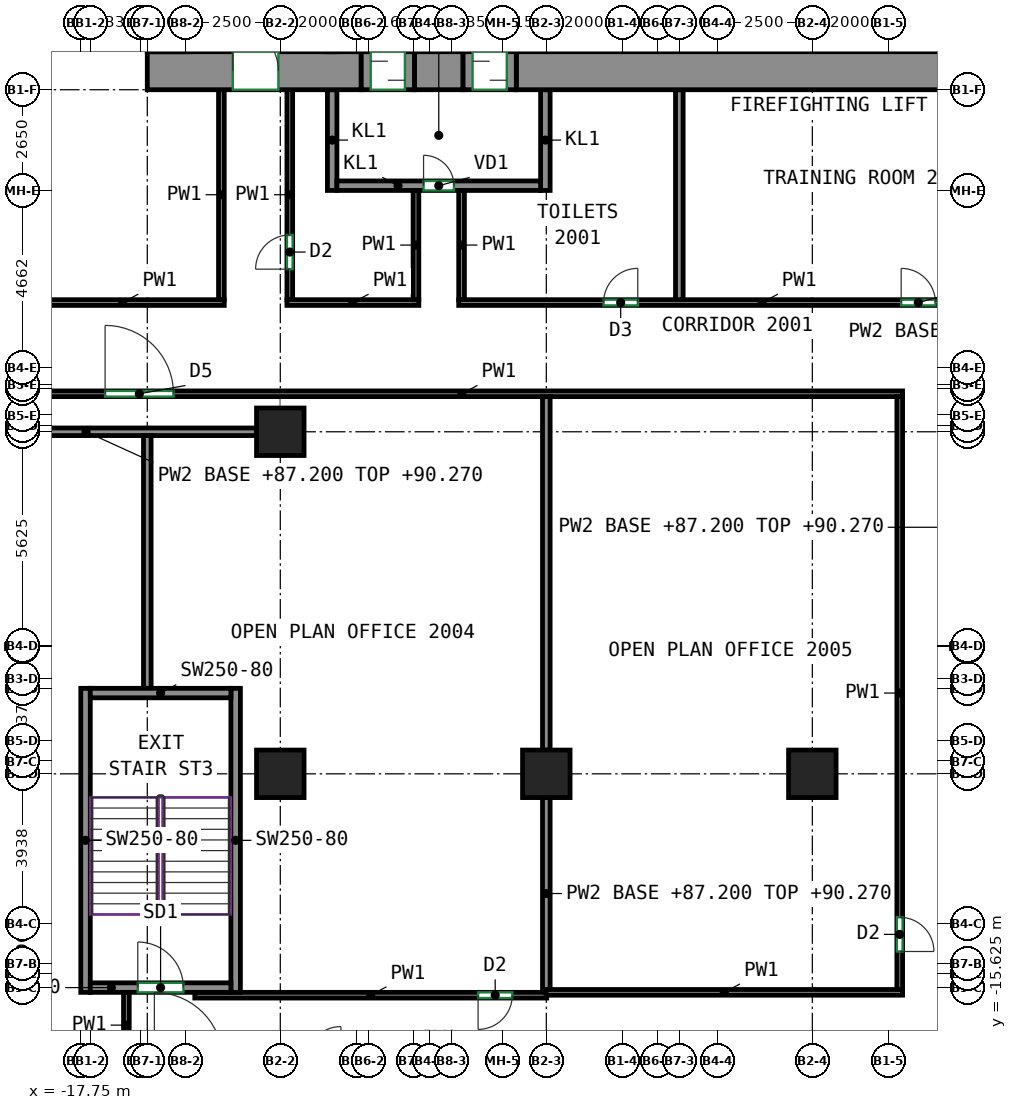
"""IFC4 building model, lengths in metres.
Left out: names, types, materials, properties, quantities, classifications, styles, units other than length and angle.
Written with IfcOpenShell. Run it as: python <this file> out.ifc"""

import sys

from ifc_helpers import new_model, si_unit, direction, frame, frame_2d, origin, origin_2d, place, context, subcontext, project, spatial, rectangle, extrude, source, transform, mapped, element, fill, save


model = new_model("IFC4")
c1 = context("Model", 3, precision=1e-05, world=origin(), true_north=direction((0.0, 1.0)))
c2 = subcontext(c1, "Body", "Model", "MODEL_VIEW")
j1 = project(units=[si_unit("LENGTHUNIT", "METRE"), si_unit("PLANEANGLEUNIT", "RADIAN")], contexts=[c1])
p1 = place(None, origin())
s1 = spatial("IfcSite", under=j1, at=p1, CompositionType="ELEMENT")
p2 = place(p1, origin())
s2 = spatial("IfcBuilding", under=s1, at=p2, CompositionType="ELEMENT")
p3 = place(p2, frame((0.0, 0.0, 87.2)))
s3 = spatial("IfcBuildingStorey", under=s2, at=p3, CompositionType="ELEMENT", Elevation=87.2)
m1 = source(origin(), c2, "Body", "SweptSolid", [
    extrude(rectangle(XDim=1.25, YDim=1.25, at=origin_2d()), origin(), (0.0, 0.0, 1.0), 3.72),
])
for number, where, z_axis, x_axis in (
    (1, (-12.5, -10.0, 0.0), (0.0, 0.0, 1.0), (1.0, 0.0, 0.0)),
    (2, (-12.5, -1.0, 0.0), (0.0, 0.0, 1.0), (1.0, 0.0, 0.0)),
    (3, (-5.5, -10.0, 0.0), (0.0, 0.0, 1.0), (1.0, 0.0, 0.0)),
    (4, (1.5, -10.0, 0.0), (0.0, 0.0, 1.0), (1.0, 0.0, 0.0)),
):
    element("IfcColumn", number, at=place(p3, frame(where, z_axis=z_axis, x_axis=x_axis)), inside=s3, PredefinedType="COLUMN", context=c2, shape_type="MappedRepresentation", body=[
        mapped(m1, transform((0.0, 0.0, 0.0))),
    ])
m2 = source(origin(), c2, "Body", "SweptSolid", [
    extrude(rectangle(XDim=5.63, YDim=1.0, at=frame_2d((2.815, 0.0))), origin(), (0.0, 0.0, 1.0), 3.72),
])
p4 = place(p3, frame((-16.0, 8.5, 0.0), z_axis=(0.0, 0.0, 1.0), x_axis=(1.0, 0.0, 0.0)))
e5 = element("IfcWall", 5, at=p4, inside=s3, PredefinedType="SHEAR", context=c2, shape_type="MappedRepresentation", body=[
    mapped(m2, transform((0.0, 0.0, 0.0))),
])
p5 = place(p4, frame((2.25, 0.0, 0.0)))
e6 = element("IfcOpeningElement", 6, at=p5, cuts=e5, PredefinedType="OPENING", context=c2, shape_type="SweptSolid", body=[
    extrude(rectangle(XDim=1.2, YDim=2.1, at=frame_2d((0.6, 1.05))), frame((0.0, 0.51, 0.0), z_axis=(0.0, -1.0, 0.0), x_axis=(1.0, 0.0, 0.0)), (0.0, 0.0, 1.0), 1.02),
])
m3 = source(origin(), c2, "Body", "SweptSolid", [
    extrude(rectangle(XDim=1.28, YDim=1.0, at=frame_2d((0.64, 0.0))), origin(), (0.0, 0.0, 1.0), 3.72),
])
p6 = place(p3, frame((-8.97, 8.5, 0.0), z_axis=(0.0, 0.0, 1.0), x_axis=(1.0, 0.0, 0.0)))
e7 = element("IfcWall", 7, at=p6, inside=s3, PredefinedType="SHEAR", context=c2, shape_type="MappedRepresentation", body=[
    mapped(m3, transform((0.0, 0.0, 0.0))),
])
m4 = source(origin(), c2, "Body", "SweptSolid", [
    extrude(rectangle(XDim=14.18, YDim=1.0, at=frame_2d((7.09, 0.0))), origin(), (0.0, 0.0, 1.0), 3.72),
])
p7 = place(p3, frame((-6.29, 8.5, 0.0), z_axis=(0.0, 0.0, 1.0), x_axis=(1.0, 0.0, 0.0)))
e8 = element("IfcWall", 8, at=p7, inside=s3, PredefinedType="SHEAR", context=c2, shape_type="MappedRepresentation", body=[
    mapped(m4, transform((0.0, 0.0, 0.0))),
])
m5 = source(origin(), c2, "Body", "SweptSolid", [
    extrude(rectangle(XDim=8.0, YDim=0.25, at=frame_2d((4.0, 0.0))), origin(), (0.0, 0.0, 1.0), 3.72),
])
for number, where, z_axis, x_axis in (
    (9, (-17.625, -15.75, 0.0), (0.0, 0.0, 1.0), (0.0, 1.0, 0.0)),
    (10, (-13.675, -15.75, 0.0), (0.0, 0.0, 1.0), (0.0, 1.0, 0.0)),
):
    element("IfcWall", number, at=place(p3, frame(where, z_axis=z_axis, x_axis=x_axis)), inside=s3, PredefinedType="SHEAR", context=c2, shape_type="MappedRepresentation", body=[
        mapped(m5, transform((0.0, 0.0, 0.0))),
    ])
m6 = source(origin(), c2, "Body", "SweptSolid", [
    extrude(rectangle(XDim=3.7, YDim=0.25, at=frame_2d((1.85, 0.0))), origin(), (0.0, 0.0, 1.0), 3.72),
])
p8 = place(p3, frame((-17.5, -15.625, 0.0), z_axis=(0.0, 0.0, 1.0), x_axis=(1.0, 0.0, 0.0)))
e11 = element("IfcWall", 11, at=p8, inside=s3, PredefinedType="SHEAR", context=c2, shape_type="MappedRepresentation", body=[
    mapped(m6, transform((0.0, 0.0, 0.0))),
])
p9 = place(p8, frame((1.25, 0.0, 0.0)))
e12 = element("IfcOpeningElement", 12, at=p9, cuts=e11, PredefinedType="OPENING", context=c2, shape_type="SweptSolid", body=[
    extrude(rectangle(XDim=1.2, YDim=2.1, at=frame_2d((0.6, 1.05))), frame((0.0, 0.135, 0.0), z_axis=(0.0, -1.0, 0.0), x_axis=(1.0, 0.0, 0.0)), (0.0, 0.0, 1.0), 0.27),
])
p10 = place(p3, frame((-17.5, -7.875, 0.0), z_axis=(0.0, 0.0, 1.0), x_axis=(1.0, 0.0, 0.0)))
e13 = element("IfcWall", 13, at=p10, inside=s3, PredefinedType="SHEAR", context=c2, shape_type="MappedRepresentation", body=[
    mapped(m6, transform((0.0, 0.0, 0.0))),
])
m7 = source(origin(), c2, "Body", "SweptSolid", [
    extrude(rectangle(XDim=2.65, YDim=0.25, at=frame_2d((1.325, 0.0))), origin(), (0.0, 0.0, 1.0), 3.72),
])
for number, where, z_axis, x_axis in (
    (14, (-11.135, 5.35, 0.0), (0.0, 0.0, 1.0), (0.0, 1.0, 0.0)),
    (15, (-5.525, 5.35, 0.0), (0.0, 0.0, 1.0), (0.0, 1.0, 0.0)),
):
    element("IfcWall", number, at=place(p3, frame(where, z_axis=z_axis, x_axis=x_axis)), inside=s3, PredefinedType="PARTITIONING", context=c2, shape_type="MappedRepresentation", body=[
        mapped(m7, transform((0.0, 0.0, 0.0))),
    ])
m8 = source(origin(), c2, "Body", "SweptSolid", [
    extrude(rectangle(XDim=5.36, YDim=0.25, at=frame_2d((2.68, 0.0))), origin(), (0.0, 0.0, 1.0), 3.72),
])
p11 = place(p3, frame((-11.01, 5.475, 0.0), z_axis=(0.0, 0.0, 1.0), x_axis=(1.0, 0.0, 0.0)))
e16 = element("IfcWall", 16, at=p11, inside=s3, PredefinedType="PARTITIONING", context=c2, shape_type="MappedRepresentation", body=[
    mapped(m8, transform((0.0, 0.0, 0.0))),
])
p12 = place(p11, frame((2.28, 0.0, 0.0)))
e17 = element("IfcOpeningElement", 17, at=p12, cuts=e16, PredefinedType="OPENING", context=c2, shape_type="SweptSolid", body=[
    extrude(rectangle(XDim=0.8, YDim=2.0, at=frame_2d((0.4, 1.0))), frame((0.0, 0.135, 0.0), z_axis=(0.0, -1.0, 0.0), x_axis=(1.0, 0.0, 0.0)), (0.0, 0.0, 1.0), 0.27),
])
m9 = source(origin(), c2, "Body", "SweptSolid", [
    extrude(rectangle(XDim=1.4, YDim=1.0, at=frame_2d((0.7, 0.0))), origin(), (0.0, 0.0, 1.0), 2.7),
])
p13 = place(p3, frame((-10.37, 8.5, 0.0), z_axis=(0.0, 0.0, 1.0), x_axis=(1.0, 0.0, 0.0)))
e18 = element("IfcWall", 18, at=p13, inside=s3, PredefinedType="PARTITIONING", context=c2, shape_type="MappedRepresentation", body=[
    mapped(m9, transform((0.0, 0.0, 0.0))),
])
p14 = place(p13, frame((0.25, 0.0, 0.0)))
e19 = element("IfcOpeningElement", 19, at=p14, cuts=e18, PredefinedType="OPENING", context=c2, shape_type="SweptSolid", body=[
    extrude(rectangle(XDim=0.9, YDim=2.1, at=frame_2d((0.45, 1.05))), frame((0.0, 0.51, 0.0), z_axis=(0.0, -1.0, 0.0), x_axis=(1.0, 0.0, 0.0)), (0.0, 0.0, 1.0), 1.02),
])
m10 = source(origin(), c2, "Body", "SweptSolid", [
    extrude(rectangle(XDim=1.4, YDim=1.0, at=frame_2d((0.7, 0.0))), origin(), (0.0, 0.0, 1.0), 2.7),
])
p15 = place(p3, frame((-7.69, 8.5, 0.0), z_axis=(0.0, 0.0, 1.0), x_axis=(1.0, 0.0, 0.0)))
e20 = element("IfcWall", 20, at=p15, inside=s3, PredefinedType="PARTITIONING", context=c2, shape_type="MappedRepresentation", body=[
    mapped(m10, transform((0.0, 0.0, 0.0))),
])
p16 = place(p15, frame((0.25, 0.0, 0.0)))
e21 = element("IfcOpeningElement", 21, at=p16, cuts=e20, PredefinedType="OPENING", context=c2, shape_type="SweptSolid", body=[
    extrude(rectangle(XDim=0.9, YDim=2.1, at=frame_2d((0.45, 1.05))), frame((0.0, 0.51, 0.0), z_axis=(0.0, -1.0, 0.0), x_axis=(1.0, 0.0, 0.0)), (0.0, 0.0, 1.0), 1.02),
])
p17 = place(p3, frame((-16.55, -15.75, 0.0), z_axis=(0.0, 0.0, 1.0), x_axis=(0.0, -1.0, 0.0)))
e22 = element("IfcWall", 22, at=p17, inside=s3, PredefinedType="PARTITIONING", context=c2, shape_type="SweptSolid", body=[
    extrude(rectangle(XDim=1.725, YDim=0.15, at=frame_2d((0.863, 0.0))), origin(), (0.0, 0.0, 1.0), 3.72),
])
p18 = place(p3, frame((-19.325, 0.0, 0.0), z_axis=(0.0, 0.0, 1.0), x_axis=(1.0, 0.0, 0.0)))
e23 = element("IfcWall", 23, at=p18, inside=s3, PredefinedType="PARTITIONING", context=c2, shape_type="SweptSolid", body=[
    extrude(rectangle(XDim=23.2, YDim=0.15, at=frame_2d((11.6, 0.0))), origin(), (0.0, 0.0, 1.0), 3.72),
])
p19 = place(p18, frame((2.215, 0.0, 0.0)))
e24 = element("IfcOpeningElement", 24, at=p19, cuts=e23, PredefinedType="OPENING", context=c2, shape_type="SweptSolid", body=[
    extrude(rectangle(XDim=1.8, YDim=2.1, at=frame_2d((0.9, 1.05))), frame((0.0, 0.085, 0.0), z_axis=(0.0, -1.0, 0.0), x_axis=(1.0, 0.0, 0.0)), (0.0, 0.0, 1.0), 0.17),
])
p20 = place(p3, frame((-19.325, 2.4, 0.0), z_axis=(0.0, 0.0, 1.0), x_axis=(1.0, 0.0, 0.0)))
e25 = element("IfcWall", 25, at=p20, inside=s3, PredefinedType="PARTITIONING", context=c2, shape_type="SweptSolid", body=[
    extrude(rectangle(XDim=5.35, YDim=0.15, at=frame_2d((2.675, 0.0))), origin(), (0.0, 0.0, 1.0), 3.72),
])
p21 = place(p3, frame((-14.05, 8.0, 0.0), z_axis=(0.0, 0.0, 1.0), x_axis=(0.0, -1.0, 0.0)))
e26 = element("IfcWall", 26, at=p21, inside=s3, PredefinedType="PARTITIONING", context=c2, shape_type="SweptSolid", body=[
    extrude(rectangle(XDim=5.525, YDim=0.15, at=frame_2d((2.762, 0.0))), origin(), (0.0, 0.0, 1.0), 3.72),
])
p22 = place(p3, frame((-5.49, -15.825, 0.0), z_axis=(0.0, 0.0, 1.0), x_axis=(-1.0, 0.0, 0.0)))
e27 = element("IfcWall", 27, at=p22, inside=s3, PredefinedType="PARTITIONING", context=c2, shape_type="SweptSolid", body=[
    extrude(rectangle(XDim=9.26, YDim=0.15, at=frame_2d((4.63, 0.0))), origin(), (0.0, 0.0, 1.0), 3.72),
])
p23 = place(p22, frame((0.905, 0.0, 0.0)))
e28 = element("IfcOpeningElement", 28, at=p23, cuts=e27, PredefinedType="OPENING", context=c2, shape_type="SweptSolid", body=[
    extrude(rectangle(XDim=0.9, YDim=2.1, at=frame_2d((0.45, 1.05))), frame((0.0, 0.085, 0.0), z_axis=(0.0, -1.0, 0.0), x_axis=(1.0, 0.0, 0.0)), (0.0, 0.0, 1.0), 0.17),
])
p24 = place(p3, frame((3.875, -15.75, 0.0), z_axis=(0.0, 0.0, 1.0), x_axis=(-1.0, 0.0, 0.0)))
e29 = element("IfcWall", 29, at=p24, inside=s3, PredefinedType="PARTITIONING", context=c2, shape_type="SweptSolid", body=[
    extrude(rectangle(XDim=9.385, YDim=0.15, at=frame_2d((4.692, 0.0))), origin(), (0.0, 0.0, 1.0), 3.72),
])
p25 = place(p3, frame((3.8, -0.075, 0.0), z_axis=(0.0, 0.0, 1.0), x_axis=(0.0, -1.0, 0.0)))
e30 = element("IfcWall", 30, at=p25, inside=s3, PredefinedType="PARTITIONING", context=c2, shape_type="SweptSolid", body=[
    extrude(rectangle(XDim=15.6, YDim=0.15, at=frame_2d((7.8, 0.0))), origin(), (0.0, 0.0, 1.0), 3.72),
])
p26 = place(p25, frame((13.7, 0.0, 0.0)))
e31 = element("IfcOpeningElement", 31, at=p26, cuts=e30, PredefinedType="OPENING", context=c2, shape_type="SweptSolid", body=[
    extrude(rectangle(XDim=0.9, YDim=2.1, at=frame_2d((0.45, 1.05))), frame((0.0, 0.085, 0.0), z_axis=(0.0, -1.0, 0.0), x_axis=(1.0, 0.0, 0.0)), (0.0, 0.0, 1.0), 0.17),
])
p27 = place(p3, frame((-12.25, 2.475, 0.0), z_axis=(0.0, 0.0, 1.0), x_axis=(0.0, 1.0, 0.0)))
e32 = element("IfcWall", 32, at=p27, inside=s3, PredefinedType="PARTITIONING", context=c2, shape_type="SweptSolid", body=[
    extrude(rectangle(XDim=5.525, YDim=0.15, at=frame_2d((2.762, 0.0))), origin(), (0.0, 0.0, 1.0), 3.72),
])
p28 = place(p27, frame((0.804, 0.0, 0.0)))
e33 = element("IfcOpeningElement", 33, at=p28, cuts=e32, PredefinedType="OPENING", context=c2, shape_type="SweptSolid", body=[
    extrude(rectangle(XDim=0.9, YDim=2.1, at=frame_2d((0.45, 1.05))), frame((0.0, 0.085, 0.0), z_axis=(0.0, -1.0, 0.0), x_axis=(1.0, 0.0, 0.0)), (0.0, 0.0, 1.0), 0.17),
])
p29 = place(p3, frame((-12.325, 2.4, 0.0), z_axis=(0.0, 0.0, 1.0), x_axis=(1.0, 0.0, 0.0)))
e34 = element("IfcWall", 34, at=p29, inside=s3, PredefinedType="PARTITIONING", context=c2, shape_type="SweptSolid", body=[
    extrude(rectangle(XDim=3.47, YDim=0.15, at=frame_2d((1.735, 0.0))), origin(), (0.0, 0.0, 1.0), 3.72),
])
for number, where, z_axis, x_axis in (
    (35, (-8.93, 5.35, 0.0), (0.0, 0.0, 1.0), (0.0, -1.0, 0.0)),
    (36, (-7.73, 2.475, 0.0), (0.0, 0.0, 1.0), (0.0, 1.0, 0.0)),
):
    element("IfcWall", number, at=place(p3, frame(where, z_axis=z_axis, x_axis=x_axis)), inside=s3, PredefinedType="PARTITIONING", context=c2, shape_type="SweptSolid", body=[
        extrude(rectangle(XDim=2.875, YDim=0.15, at=frame_2d((1.438, 0.0))), origin(), (0.0, 0.0, 1.0), 3.72),
    ])
p30 = place(p3, frame((-7.805, 2.4, 0.0), z_axis=(0.0, 0.0, 1.0), x_axis=(1.0, 0.0, 0.0)))
e37 = element("IfcWall", 37, at=p30, inside=s3, PredefinedType="PARTITIONING", context=c2, shape_type="SweptSolid", body=[
    extrude(rectangle(XDim=15.97, YDim=0.15, at=frame_2d((7.985, 0.0))), origin(), (0.0, 0.0, 1.0), 3.72),
])
p31 = place(p30, frame((3.812, 0.0, 0.0)))
e38 = element("IfcOpeningElement", 38, at=p31, cuts=e37, PredefinedType="OPENING", context=c2, shape_type="SweptSolid", body=[
    extrude(rectangle(XDim=0.9, YDim=2.1, at=frame_2d((0.45, 1.05))), frame((0.0, 0.085, 0.0), z_axis=(0.0, -1.0, 0.0), x_axis=(1.0, 0.0, 0.0)), (0.0, 0.0, 1.0), 0.17),
])
p32 = place(p30, frame((11.643, 0.0, 0.0)))
e39 = element("IfcOpeningElement", 39, at=p32, cuts=e37, PredefinedType="OPENING", context=c2, shape_type="SweptSolid", body=[
    extrude(rectangle(XDim=0.9, YDim=2.1, at=frame_2d((0.45, 1.05))), frame((0.0, 0.085, 0.0), z_axis=(0.0, -1.0, 0.0), x_axis=(1.0, 0.0, 0.0)), (0.0, 0.0, 1.0), 0.17),
])
p33 = place(p3, frame((-22.1, -1.0, 0.0), z_axis=(0.0, 0.0, 1.0), x_axis=(1.0, 0.0, 0.0)))
e40 = element("IfcWall", 40, at=p33, inside=s3, PredefinedType="PARTITIONING", context=c2, shape_type="SweptSolid", body=[
    extrude(rectangle(XDim=8.975, YDim=0.2, at=frame_2d((4.488, 0.0))), origin(), (0.0, 0.0, 1.0), 3.07),
])
p34 = place(p3, frame((-16.0, -7.75, 0.0), z_axis=(0.0, 0.0, 1.0), x_axis=(0.0, 1.0, 0.0)))
e41 = element("IfcWall", 41, at=p34, inside=s3, PredefinedType="PARTITIONING", context=c2, shape_type="SweptSolid", body=[
    extrude(rectangle(XDim=6.65, YDim=0.2, at=frame_2d((3.325, 0.0))), origin(), (0.0, 0.0, 1.0), 3.72),
])
p35 = place(p3, frame((-5.5, -9.375, 0.0), z_axis=(0.0, 0.0, 1.0), x_axis=(0.0, 1.0, 0.0)))
e42 = element("IfcWall", 42, at=p35, inside=s3, PredefinedType="PARTITIONING", context=c2, shape_type="SweptSolid", body=[
    extrude(rectangle(XDim=9.299, YDim=0.2, at=frame_2d((4.649, 0.0))), origin(), (0.0, 0.0, 1.0), 3.72),
])
p36 = place(p3, frame((-5.5, -15.674, 0.0), z_axis=(0.0, 0.0, 1.0), x_axis=(0.0, 1.0, 0.0)))
e43 = element("IfcWall", 43, at=p36, inside=s3, PredefinedType="PARTITIONING", context=c2, shape_type="SweptSolid", body=[
    extrude(rectangle(XDim=5.049, YDim=0.2, at=frame_2d((2.524, 0.0))), origin(), (0.0, 0.0, 1.0), 3.07),
])
p37 = place(p3, frame((-2.0, 2.476, 0.0), z_axis=(0.0, 0.0, 1.0), x_axis=(0.0, 1.0, 0.0)))
e44 = element("IfcWall", 44, at=p37, inside=s3, PredefinedType="PARTITIONING", context=c2, shape_type="SweptSolid", body=[
    extrude(rectangle(XDim=5.524, YDim=0.2, at=frame_2d((2.762, 0.0))), origin(), (0.0, 0.0, 1.0), 3.72),
])
p38 = place(p12, origin())
e45 = element("IfcDoor", 45, at=p38, inside=s3, OperationType="SINGLE_SWING_LEFT", PredefinedType="DOOR", context=c2, shape_type="SweptSolid", body=[
    extrude(rectangle(XDim=0.8, YDim=2.0, at=frame_2d((0.4, 1.0))), frame((0.0, 0.025, 0.0), z_axis=(0.0, -1.0, 0.0), x_axis=(1.0, 0.0, 0.0)), (0.0, 0.0, 1.0), 0.05),
])
fill(e17, e45)
p39 = place(p14, origin())
e46 = element("IfcDoor", 46, at=p39, inside=s3, OperationType="SLIDING_TO_LEFT", PredefinedType="DOOR", context=c2, shape_type="SweptSolid", body=[
    extrude(rectangle(XDim=0.9, YDim=2.1, at=frame_2d((0.45, 1.05))), frame((0.0, 0.405, 0.0), z_axis=(0.0, -1.0, 0.0), x_axis=(1.0, 0.0, 0.0)), (0.0, 0.0, 1.0), 0.05),
])
fill(e19, e46)
p40 = place(p16, origin())
e47 = element("IfcDoor", 47, at=p40, inside=s3, OperationType="SLIDING_TO_RIGHT", PredefinedType="DOOR", context=c2, shape_type="SweptSolid", body=[
    extrude(rectangle(XDim=0.9, YDim=2.1, at=frame_2d((0.45, 1.05))), frame((0.0, 0.405, 0.0), z_axis=(0.0, -1.0, 0.0), x_axis=(1.0, 0.0, 0.0)), (0.0, 0.0, 1.0), 0.05),
])
fill(e21, e47)
p41 = place(p5, origin())
e48 = element("IfcDoor", 48, at=p41, inside=s3, OperationType="DOUBLE_DOOR_SINGLE_SWING", PredefinedType="DOOR", context=c2, shape_type="SweptSolid", body=[
    extrude(rectangle(XDim=1.2, YDim=2.1, at=frame_2d((0.6, 1.05))), frame((0.0, 0.405, 0.0), z_axis=(0.0, -1.0, 0.0), x_axis=(1.0, 0.0, 0.0)), (0.0, 0.0, 1.0), 0.05),
])
fill(e6, e48)
p42 = place(p9, origin())
e49 = element("IfcDoor", 49, at=p42, inside=s3, OperationType="DOUBLE_DOOR_SINGLE_SWING", PredefinedType="DOOR", context=c2, shape_type="SweptSolid", body=[
    extrude(rectangle(XDim=1.2, YDim=2.1, at=frame_2d((0.6, 1.05))), frame((0.0, 0.025, 0.0), z_axis=(0.0, -1.0, 0.0), x_axis=(1.0, 0.0, 0.0)), (0.0, 0.0, 1.0), 0.05),
])
fill(e12, e49)
p43 = place(p23, origin())
e50 = element("IfcDoor", 50, at=p43, inside=s3, OperationType="SINGLE_SWING_RIGHT", PredefinedType="DOOR", context=c2, shape_type="SweptSolid", body=[
    extrude(rectangle(XDim=0.9, YDim=2.1, at=frame_2d((0.45, 1.05))), frame((0.0, 0.025, 0.0), z_axis=(0.0, -1.0, 0.0), x_axis=(1.0, 0.0, 0.0)), (0.0, 0.0, 1.0), 0.05),
])
fill(e28, e50)
p44 = place(p26, origin())
e51 = element("IfcDoor", 51, at=p44, inside=s3, OperationType="SINGLE_SWING_RIGHT", PredefinedType="DOOR", context=c2, shape_type="SweptSolid", body=[
    extrude(rectangle(XDim=0.9, YDim=2.1, at=frame_2d((0.45, 1.05))), frame((0.0, 0.025, 0.0), z_axis=(0.0, -1.0, 0.0), x_axis=(1.0, 0.0, 0.0)), (0.0, 0.0, 1.0), 0.05),
])
fill(e31, e51)
p45 = place(p19, origin())
e52 = element("IfcDoor", 52, at=p45, inside=s3, OperationType="DOUBLE_DOOR_SINGLE_SWING", PredefinedType="DOOR", context=c2, shape_type="SweptSolid", body=[
    extrude(rectangle(XDim=1.8, YDim=2.1, at=frame_2d((0.9, 1.05))), frame((0.0, 0.025, 0.0), z_axis=(0.0, -1.0, 0.0), x_axis=(1.0, 0.0, 0.0)), (0.0, 0.0, 1.0), 0.05),
])
fill(e24, e52)
p46 = place(p31, origin())
e53 = element("IfcDoor", 53, at=p46, inside=s3, OperationType="SINGLE_SWING_RIGHT", PredefinedType="DOOR", context=c2, shape_type="SweptSolid", body=[
    extrude(rectangle(XDim=0.9, YDim=2.1, at=frame_2d((0.45, 1.05))), frame((0.0, 0.025, 0.0), z_axis=(0.0, -1.0, 0.0), x_axis=(1.0, 0.0, 0.0)), (0.0, 0.0, 1.0), 0.05),
])
fill(e38, e53)
p47 = place(p32, origin())
e54 = element("IfcDoor", 54, at=p47, inside=s3, OperationType="SINGLE_SWING_LEFT", PredefinedType="DOOR", context=c2, shape_type="SweptSolid", body=[
    extrude(rectangle(XDim=0.9, YDim=2.1, at=frame_2d((0.45, 1.05))), frame((0.0, 0.025, 0.0), z_axis=(0.0, -1.0, 0.0), x_axis=(1.0, 0.0, 0.0)), (0.0, 0.0, 1.0), 0.05),
])
fill(e39, e54)
p48 = place(p28, origin())
e55 = element("IfcDoor", 55, at=p48, inside=s3, OperationType="SINGLE_SWING_LEFT", PredefinedType="DOOR", context=c2, shape_type="SweptSolid", body=[
    extrude(rectangle(XDim=0.9, YDim=2.1, at=frame_2d((0.45, 1.05))), frame((0.0, 0.025, 0.0), z_axis=(0.0, -1.0, 0.0), x_axis=(1.0, 0.0, 0.0)), (0.0, 0.0, 1.0), 0.05),
])
fill(e33, e55)
save(model, sys.argv[1])
